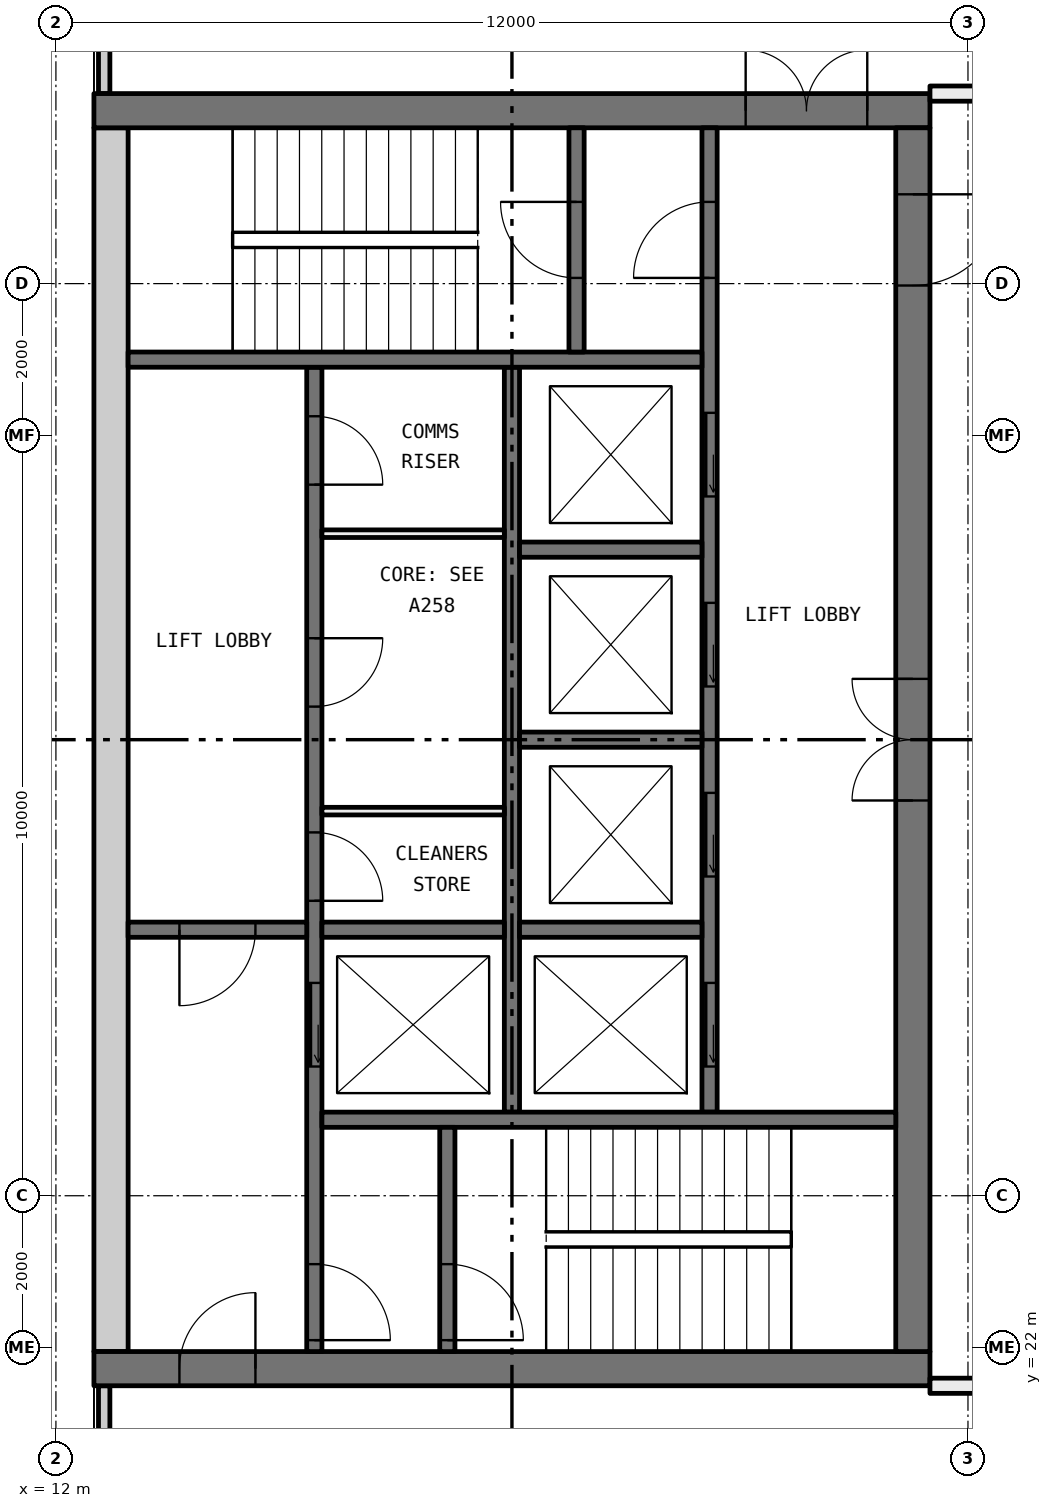
"""IFC4 building model, lengths in metres.
Left out: names, types, materials, properties, quantities, classifications, styles, units other than length and angle.
Written with IfcOpenShell. Run it as: python <this file> out.ifc"""

import sys

from ifc_helpers import new_model, si_unit, direction, frame, frame_2d, origin, place, context, subcontext, project, spatial, rectangle, extrude, element, fill, save


model = new_model("IFC4")
c1 = context("Model", 3, precision=1e-05, world=origin(), true_north=direction((0.0, 1.0)))
c2 = subcontext(c1, "Body", "Model", "MODEL_VIEW")
j1 = project(units=[si_unit("LENGTHUNIT", "METRE"), si_unit("PLANEANGLEUNIT", "RADIAN")], contexts=[c1])
p1 = place(None, origin())
s1 = spatial("IfcSite", under=j1, at=p1, CompositionType="ELEMENT")
p2 = place(p1, origin())
s2 = spatial("IfcBuilding", under=s1, at=p2, CompositionType="ELEMENT")
p3 = place(p2, frame((0.0, 0.0, 213.45)))
s3 = spatial("IfcBuildingStorey", under=s2, at=p3, CompositionType="ELEMENT", Elevation=213.45)
for number, where, z_axis, x_axis in (
    (1, (12.635, 18.71, 0.0), (0.0, 0.0, 1.0), (0.0, 1.0, 0.0)),
    (2, (12.635, 38.5, 0.0), (0.0, 0.0, 1.0), (0.0, 1.0, 0.0)),
):
    element("IfcWall", number, at=place(p3, frame(where, z_axis=z_axis, x_axis=x_axis)), inside=s3, PredefinedType="ELEMENTEDWALL", context=c2, shape_type="SweptSolid", body=[
        extrude(rectangle(XDim=2.79, YDim=0.15, at=frame_2d((1.395, 0.0))), origin(), (0.0, 0.0, 1.0), 4.1),
    ])
p4 = place(p3, frame((29.5, 21.5, 0.0), z_axis=(0.0, 0.0, 1.0), x_axis=(-1.0, 0.0, 0.0)))
e3 = element("IfcWall", 3, at=p4, inside=s3, PredefinedType="PARTITIONING", context=c2, shape_type="SweptSolid", body=[
    extrude(rectangle(XDim=6.0, YDim=0.2, at=frame_2d((3.0, 0.0))), origin(), (0.0, 0.0, 1.0), 4.1),
])
p5 = place(p4, frame((2.55, 0.0, 0.0)))
e4 = element("IfcOpeningElement", 4, at=p5, cuts=e3, PredefinedType="OPENING", context=c2, shape_type="SweptSolid", body=[
    extrude(rectangle(XDim=0.9, YDim=2.1, at=frame_2d((0.45, 1.05))), frame((0.0, 0.11, 0.0), z_axis=(0.0, -1.0, 0.0), x_axis=(1.0, 0.0, 0.0)), (0.0, 0.0, 1.0), 0.22),
])
p6 = place(p3, frame((23.5, 38.5, 0.0), z_axis=(0.0, 0.0, 1.0), x_axis=(1.0, 0.0, 0.0)))
e5 = element("IfcWall", 5, at=p6, inside=s3, PredefinedType="PARTITIONING", context=c2, shape_type="SweptSolid", body=[
    extrude(rectangle(XDim=6.0, YDim=0.2, at=frame_2d((3.0, 0.0))), origin(), (0.0, 0.0, 1.0), 4.1),
])
p7 = place(p3, frame((12.5, 21.725, 0.0), z_axis=(0.0, 0.0, 1.0), x_axis=(1.0, 0.0, 0.0)))
e6 = element("IfcWall", 6, at=p7, inside=s3, PredefinedType="SHEAR", context=c2, shape_type="SweptSolid", body=[
    extrude(rectangle(XDim=11.0, YDim=0.45, at=frame_2d((5.5, 0.0))), origin(), (0.0, 0.0, 1.0), 4.1),
])
p8 = place(p7, frame((1.125, 0.0, 0.0)))
e7 = element("IfcOpeningElement", 7, at=p8, cuts=e6, PredefinedType="OPENING", context=c2, shape_type="SweptSolid", body=[
    extrude(rectangle(XDim=1.0, YDim=2.1, at=frame_2d((0.5, 1.05))), frame((0.0, 0.235, 0.0), z_axis=(0.0, -1.0, 0.0), x_axis=(1.0, 0.0, 0.0)), (0.0, 0.0, 1.0), 0.47),
])
p9 = place(p3, frame((12.5, 38.275, 0.0), z_axis=(0.0, 0.0, 1.0), x_axis=(1.0, 0.0, 0.0)))
e8 = element("IfcWall", 8, at=p9, inside=s3, PredefinedType="SHEAR", context=c2, shape_type="SweptSolid", body=[
    extrude(rectangle(XDim=11.0, YDim=0.45, at=frame_2d((5.5, 0.0))), origin(), (0.0, 0.0, 1.0), 4.1),
])
p10 = place(p9, frame((8.575, 0.0, 0.0)))
e9 = element("IfcOpeningElement", 9, at=p10, cuts=e8, PredefinedType="OPENING", context=c2, shape_type="SweptSolid", body=[
    extrude(rectangle(XDim=1.6, YDim=2.1, at=frame_2d((0.8, 1.05))), frame((0.0, 0.235, 0.0), z_axis=(0.0, -1.0, 0.0), x_axis=(1.0, 0.0, 0.0)), (0.0, 0.0, 1.0), 0.47),
])
p11 = place(p3, frame((12.725, 21.95, 0.0), z_axis=(0.0, 0.0, 1.0), x_axis=(0.0, 1.0, 0.0)))
e10 = element("IfcWall", 10, at=p11, inside=s3, PredefinedType="SHEAR", context=c2, shape_type="SweptSolid", body=[
    extrude(rectangle(XDim=16.1, YDim=0.45, at=frame_2d((8.05, 0.0))), origin(), (0.0, 0.0, 1.0), 4.1),
])
p12 = place(p3, frame((23.275, 21.95, 0.0), z_axis=(0.0, 0.0, 1.0), x_axis=(0.0, 1.0, 0.0)))
e11 = element("IfcWall", 11, at=p12, inside=s3, PredefinedType="SHEAR", context=c2, shape_type="SweptSolid", body=[
    extrude(rectangle(XDim=16.1, YDim=0.45, at=frame_2d((8.05, 0.0))), origin(), (0.0, 0.0, 1.0), 4.1),
])
p13 = place(p12, frame((7.25, 0.0, 0.0)))
e12 = element("IfcOpeningElement", 12, at=p13, cuts=e11, PredefinedType="OPENING", context=c2, shape_type="SweptSolid", body=[
    extrude(rectangle(XDim=1.6, YDim=2.1, at=frame_2d((0.8, 1.05))), frame((0.0, 0.235, 0.0), z_axis=(0.0, -1.0, 0.0), x_axis=(1.0, 0.0, 0.0)), (0.0, 0.0, 1.0), 0.47),
])
p14 = place(p12, frame((14.025, 0.0, 0.0)))
e13 = element("IfcOpeningElement", 13, at=p14, cuts=e11, PredefinedType="OPENING", context=c2, shape_type="SweptSolid", body=[
    extrude(rectangle(XDim=1.2, YDim=2.1, at=frame_2d((0.6, 1.05))), frame((0.0, 0.235, 0.0), z_axis=(0.0, -1.0, 0.0), x_axis=(1.0, 0.0, 0.0)), (0.0, 0.0, 1.0), 0.47),
])
p15 = place(p3, frame((15.4, 21.95, 0.0), z_axis=(0.0, 0.0, 1.0), x_axis=(0.0, 1.0, 0.0)))
e14 = element("IfcWall", 14, at=p15, inside=s3, PredefinedType="SOLIDWALL", context=c2, shape_type="SweptSolid", body=[
    extrude(rectangle(XDim=12.95, YDim=0.2, at=frame_2d((6.475, 0.0))), origin(), (0.0, 0.0, 1.0), 4.1),
])
p16 = place(p15, frame((3.75, 0.0, 0.0)))
e15 = element("IfcOpeningElement", 15, at=p16, cuts=e14, PredefinedType="OPENING", context=c2, shape_type="SweptSolid", body=[
    extrude(rectangle(XDim=1.1, YDim=2.1, at=frame_2d((0.55, 1.05))), frame((0.0, 0.11, 0.0), z_axis=(0.0, -1.0, 0.0), x_axis=(1.0, 0.0, 0.0)), (0.0, 0.0, 1.0), 0.22),
])
p17 = place(p15, frame((0.15, 0.0, 0.0)))
e16 = element("IfcOpeningElement", 16, at=p17, cuts=e14, PredefinedType="OPENING", context=c2, shape_type="SweptSolid", body=[
    extrude(rectangle(XDim=1.0, YDim=2.1, at=frame_2d((0.5, 1.05))), frame((0.0, 0.11, 0.0), z_axis=(0.0, -1.0, 0.0), x_axis=(1.0, 0.0, 0.0)), (0.0, 0.0, 1.0), 0.22),
])
p18 = place(p15, frame((5.93, 0.0, 0.0)))
e17 = element("IfcOpeningElement", 17, at=p18, cuts=e14, PredefinedType="OPENING", context=c2, shape_type="SweptSolid", body=[
    extrude(rectangle(XDim=0.9, YDim=2.1, at=frame_2d((0.45, 1.05))), frame((0.0, 0.11, 0.0), z_axis=(0.0, -1.0, 0.0), x_axis=(1.0, 0.0, 0.0)), (0.0, 0.0, 1.0), 0.22),
])
p19 = place(p15, frame((8.485, 0.0, 0.0)))
e18 = element("IfcOpeningElement", 18, at=p19, cuts=e14, PredefinedType="OPENING", context=c2, shape_type="SweptSolid", body=[
    extrude(rectangle(XDim=0.9, YDim=2.1, at=frame_2d((0.45, 1.05))), frame((0.0, 0.11, 0.0), z_axis=(0.0, -1.0, 0.0), x_axis=(1.0, 0.0, 0.0)), (0.0, 0.0, 1.0), 0.22),
])
p20 = place(p15, frame((11.405, 0.0, 0.0)))
e19 = element("IfcOpeningElement", 19, at=p20, cuts=e14, PredefinedType="OPENING", context=c2, shape_type="SweptSolid", body=[
    extrude(rectangle(XDim=0.9, YDim=2.1, at=frame_2d((0.45, 1.05))), frame((0.0, 0.11, 0.0), z_axis=(0.0, -1.0, 0.0), x_axis=(1.0, 0.0, 0.0)), (0.0, 0.0, 1.0), 0.22),
])
p21 = place(p3, frame((20.6, 25.1, 0.0), z_axis=(0.0, 0.0, 1.0), x_axis=(0.0, 1.0, 0.0)))
e20 = element("IfcWall", 20, at=p21, inside=s3, PredefinedType="SOLIDWALL", context=c2, shape_type="SweptSolid", body=[
    extrude(rectangle(XDim=12.95, YDim=0.2, at=frame_2d((6.475, 0.0))), origin(), (0.0, 0.0, 1.0), 4.1),
])
p22 = place(p21, frame((0.6, 0.0, 0.0)))
e21 = element("IfcOpeningElement", 21, at=p22, cuts=e20, PredefinedType="OPENING", context=c2, shape_type="SweptSolid", body=[
    extrude(rectangle(XDim=1.1, YDim=2.1, at=frame_2d((0.55, 1.05))), frame((0.0, 0.11, 0.0), z_axis=(0.0, -1.0, 0.0), x_axis=(1.0, 0.0, 0.0)), (0.0, 0.0, 1.0), 0.22),
])
p23 = place(p21, frame((3.1, 0.0, 0.0)))
e22 = element("IfcOpeningElement", 22, at=p23, cuts=e20, PredefinedType="OPENING", context=c2, shape_type="SweptSolid", body=[
    extrude(rectangle(XDim=1.1, YDim=2.1, at=frame_2d((0.55, 1.05))), frame((0.0, 0.11, 0.0), z_axis=(0.0, -1.0, 0.0), x_axis=(1.0, 0.0, 0.0)), (0.0, 0.0, 1.0), 0.22),
])
p24 = place(p21, frame((5.6, 0.0, 0.0)))
e23 = element("IfcOpeningElement", 23, at=p24, cuts=e20, PredefinedType="OPENING", context=c2, shape_type="SweptSolid", body=[
    extrude(rectangle(XDim=1.1, YDim=2.1, at=frame_2d((0.55, 1.05))), frame((0.0, 0.11, 0.0), z_axis=(0.0, -1.0, 0.0), x_axis=(1.0, 0.0, 0.0)), (0.0, 0.0, 1.0), 0.22),
])
p25 = place(p21, frame((8.1, 0.0, 0.0)))
e24 = element("IfcOpeningElement", 24, at=p25, cuts=e20, PredefinedType="OPENING", context=c2, shape_type="SweptSolid", body=[
    extrude(rectangle(XDim=1.1, YDim=2.1, at=frame_2d((0.55, 1.05))), frame((0.0, 0.11, 0.0), z_axis=(0.0, -1.0, 0.0), x_axis=(1.0, 0.0, 0.0)), (0.0, 0.0, 1.0), 0.22),
])
p26 = place(p21, frame((10.975, 0.0, 0.0)))
e25 = element("IfcOpeningElement", 25, at=p26, cuts=e20, PredefinedType="OPENING", context=c2, shape_type="SweptSolid", body=[
    extrude(rectangle(XDim=1.0, YDim=2.1, at=frame_2d((0.5, 1.05))), frame((0.0, 0.11, 0.0), z_axis=(0.0, -1.0, 0.0), x_axis=(1.0, 0.0, 0.0)), (0.0, 0.0, 1.0), 0.22),
])
p27 = place(p3, frame((18.0, 25.1, 0.0), z_axis=(0.0, 0.0, 1.0), x_axis=(0.0, 1.0, 0.0)))
e26 = element("IfcWall", 26, at=p27, inside=s3, PredefinedType="SOLIDWALL", context=c2, shape_type="SweptSolid", body=[
    extrude(rectangle(XDim=9.8, YDim=0.2, at=frame_2d((4.9, 0.0))), origin(), (0.0, 0.0, 1.0), 4.1),
])
for number, where, z_axis, x_axis in (
    (27, (15.5, 25.0, 0.0), (0.0, 0.0, 1.0), (1.0, 0.0, 0.0)),
    (28, (12.95, 35.0, 0.0), (0.0, 0.0, 1.0), (1.0, 0.0, 0.0)),
):
    element("IfcWall", number, at=place(p3, frame(where, z_axis=z_axis, x_axis=x_axis)), inside=s3, PredefinedType="SOLIDWALL", context=c2, shape_type="SweptSolid", body=[
        extrude(rectangle(XDim=7.55, YDim=0.2, at=frame_2d((3.775, 0.0))), origin(), (0.0, 0.0, 1.0), 4.1),
    ])
p28 = place(p3, frame((12.95, 27.5, 0.0), z_axis=(0.0, 0.0, 1.0), x_axis=(1.0, 0.0, 0.0)))
e29 = element("IfcWall", 29, at=p28, inside=s3, PredefinedType="SOLIDWALL", context=c2, shape_type="SweptSolid", body=[
    extrude(rectangle(XDim=2.35, YDim=0.2, at=frame_2d((1.175, 0.0))), origin(), (0.0, 0.0, 1.0), 4.1),
])
p29 = place(p28, frame((0.675, 0.0, 0.0)))
e30 = element("IfcOpeningElement", 30, at=p29, cuts=e29, PredefinedType="OPENING", context=c2, shape_type="SweptSolid", body=[
    extrude(rectangle(XDim=1.0, YDim=2.1, at=frame_2d((0.5, 1.05))), frame((0.0, 0.11, 0.0), z_axis=(0.0, -1.0, 0.0), x_axis=(1.0, 0.0, 0.0)), (0.0, 0.0, 1.0), 0.22),
])
p30 = place(p3, frame((17.15, 21.95, 0.0), z_axis=(0.0, 0.0, 1.0), x_axis=(0.0, 1.0, 0.0)))
e31 = element("IfcWall", 31, at=p30, inside=s3, PredefinedType="SOLIDWALL", context=c2, shape_type="SweptSolid", body=[
    extrude(rectangle(XDim=2.95, YDim=0.2, at=frame_2d((1.475, 0.0))), origin(), (0.0, 0.0, 1.0), 4.1),
])
p31 = place(p30, frame((0.15, 0.0, 0.0)))
e32 = element("IfcOpeningElement", 32, at=p31, cuts=e31, PredefinedType="OPENING", context=c2, shape_type="SweptSolid", body=[
    extrude(rectangle(XDim=1.0, YDim=2.1, at=frame_2d((0.5, 1.05))), frame((0.0, 0.11, 0.0), z_axis=(0.0, -1.0, 0.0), x_axis=(1.0, 0.0, 0.0)), (0.0, 0.0, 1.0), 0.22),
])
p32 = place(p3, frame((18.85, 35.1, 0.0), z_axis=(0.0, 0.0, 1.0), x_axis=(0.0, 1.0, 0.0)))
e33 = element("IfcWall", 33, at=p32, inside=s3, PredefinedType="SOLIDWALL", context=c2, shape_type="SweptSolid", body=[
    extrude(rectangle(XDim=2.95, YDim=0.2, at=frame_2d((1.475, 0.0))), origin(), (0.0, 0.0, 1.0), 4.1),
])
p33 = place(p32, frame((0.975, 0.0, 0.0)))
e34 = element("IfcOpeningElement", 34, at=p33, cuts=e33, PredefinedType="OPENING", context=c2, shape_type="SweptSolid", body=[
    extrude(rectangle(XDim=1.0, YDim=2.1, at=frame_2d((0.5, 1.05))), frame((0.0, 0.11, 0.0), z_axis=(0.0, -1.0, 0.0), x_axis=(1.0, 0.0, 0.0)), (0.0, 0.0, 1.0), 0.22),
])
for number, where, z_axis, x_axis in (
    (35, (15.5, 27.5, 0.0), (0.0, 0.0, 1.0), (1.0, 0.0, 0.0)),
    (36, (18.1, 27.5, 0.0), (0.0, 0.0, 1.0), (1.0, 0.0, 0.0)),
    (37, (18.1, 30.0, 0.0), (0.0, 0.0, 1.0), (1.0, 0.0, 0.0)),
    (38, (18.1, 32.5, 0.0), (0.0, 0.0, 1.0), (1.0, 0.0, 0.0)),
):
    element("IfcWall", number, at=place(p3, frame(where, z_axis=z_axis, x_axis=x_axis)), inside=s3, PredefinedType="SOLIDWALL", context=c2, shape_type="SweptSolid", body=[
        extrude(rectangle(XDim=2.4, YDim=0.2, at=frame_2d((1.2, 0.0))), origin(), (0.0, 0.0, 1.0), 4.1),
    ])
for number, where, z_axis, x_axis in (
    (39, (15.5, 29.06, 0.0), (0.0, 0.0, 1.0), (1.0, 0.0, 0.0)),
    (40, (15.5, 32.71, 0.0), (0.0, 0.0, 1.0), (1.0, 0.0, 0.0)),
):
    element("IfcWall", number, at=place(p3, frame(where, z_axis=z_axis, x_axis=x_axis)), inside=s3, PredefinedType="PARTITIONING", context=c2, shape_type="SweptSolid", body=[
        extrude(rectangle(XDim=2.4, YDim=0.1, at=frame_2d((1.2, 0.0))), origin(), (0.0, 0.0, 1.0), 4.1),
    ])
p34 = place(p22, origin())
e41 = element("IfcDoor", 41, at=p34, inside=s3, OperationType="SLIDING_TO_LEFT", PredefinedType="DOOR", context=c2, shape_type="SweptSolid", body=[
    extrude(rectangle(XDim=1.1, YDim=2.1, at=frame_2d((0.55, 1.05))), frame((0.0, 0.025, 0.0), z_axis=(0.0, -1.0, 0.0), x_axis=(1.0, 0.0, 0.0)), (0.0, 0.0, 1.0), 0.05),
])
fill(e21, e41)
p35 = place(p23, origin())
e42 = element("IfcDoor", 42, at=p35, inside=s3, OperationType="SLIDING_TO_LEFT", PredefinedType="DOOR", context=c2, shape_type="SweptSolid", body=[
    extrude(rectangle(XDim=1.1, YDim=2.1, at=frame_2d((0.55, 1.05))), frame((0.0, 0.025, 0.0), z_axis=(0.0, -1.0, 0.0), x_axis=(1.0, 0.0, 0.0)), (0.0, 0.0, 1.0), 0.05),
])
fill(e22, e42)
p36 = place(p24, origin())
e43 = element("IfcDoor", 43, at=p36, inside=s3, OperationType="SLIDING_TO_LEFT", PredefinedType="DOOR", context=c2, shape_type="SweptSolid", body=[
    extrude(rectangle(XDim=1.1, YDim=2.1, at=frame_2d((0.55, 1.05))), frame((0.0, 0.025, 0.0), z_axis=(0.0, -1.0, 0.0), x_axis=(1.0, 0.0, 0.0)), (0.0, 0.0, 1.0), 0.05),
])
fill(e23, e43)
p37 = place(p25, origin())
e44 = element("IfcDoor", 44, at=p37, inside=s3, OperationType="SLIDING_TO_LEFT", PredefinedType="DOOR", context=c2, shape_type="SweptSolid", body=[
    extrude(rectangle(XDim=1.1, YDim=2.1, at=frame_2d((0.55, 1.05))), frame((0.0, 0.025, 0.0), z_axis=(0.0, -1.0, 0.0), x_axis=(1.0, 0.0, 0.0)), (0.0, 0.0, 1.0), 0.05),
])
fill(e24, e44)
p38 = place(p16, origin())
e45 = element("IfcDoor", 45, at=p38, inside=s3, OperationType="SLIDING_TO_LEFT", PredefinedType="DOOR", context=c2, shape_type="SweptSolid", body=[
    extrude(rectangle(XDim=1.1, YDim=2.1, at=frame_2d((0.55, 1.05))), frame((0.0, 0.025, 0.0), z_axis=(0.0, -1.0, 0.0), x_axis=(1.0, 0.0, 0.0)), (0.0, 0.0, 1.0), 0.05),
])
fill(e15, e45)
p39 = place(p31, frame((1.0, 0.0, 0.0), x_axis=(-1.0, 0.0, 0.0)))
e46 = element("IfcDoor", 46, at=p39, inside=s3, OperationType="SINGLE_SWING_LEFT", PredefinedType="DOOR", context=c2, shape_type="SweptSolid", body=[
    extrude(rectangle(XDim=1.0, YDim=2.1, at=frame_2d((0.5, 1.05))), frame((0.0, 0.025, 0.0), z_axis=(0.0, -1.0, 0.0), x_axis=(1.0, 0.0, 0.0)), (0.0, 0.0, 1.0), 0.05),
])
fill(e32, e46)
p40 = place(p17, frame((1.0, 0.0, 0.0), x_axis=(-1.0, 0.0, 0.0)))
e47 = element("IfcDoor", 47, at=p40, inside=s3, OperationType="SINGLE_SWING_LEFT", PredefinedType="DOOR", context=c2, shape_type="SweptSolid", body=[
    extrude(rectangle(XDim=1.0, YDim=2.1, at=frame_2d((0.5, 1.05))), frame((0.0, 0.025, 0.0), z_axis=(0.0, -1.0, 0.0), x_axis=(1.0, 0.0, 0.0)), (0.0, 0.0, 1.0), 0.05),
])
fill(e16, e47)
p41 = place(p26, origin())
e48 = element("IfcDoor", 48, at=p41, inside=s3, OperationType="SINGLE_SWING_RIGHT", PredefinedType="DOOR", context=c2, shape_type="SweptSolid", body=[
    extrude(rectangle(XDim=1.0, YDim=2.1, at=frame_2d((0.5, 1.05))), frame((0.0, 0.025, 0.0), z_axis=(0.0, -1.0, 0.0), x_axis=(1.0, 0.0, 0.0)), (0.0, 0.0, 1.0), 0.05),
])
fill(e25, e48)
p42 = place(p33, origin())
e49 = element("IfcDoor", 49, at=p42, inside=s3, OperationType="SINGLE_SWING_LEFT", PredefinedType="DOOR", context=c2, shape_type="SweptSolid", body=[
    extrude(rectangle(XDim=1.0, YDim=2.1, at=frame_2d((0.5, 1.05))), frame((0.0, 0.025, 0.0), z_axis=(0.0, -1.0, 0.0), x_axis=(1.0, 0.0, 0.0)), (0.0, 0.0, 1.0), 0.05),
])
fill(e34, e49)
p43 = place(p29, frame((1.0, 0.0, 0.0), x_axis=(-1.0, 0.0, 0.0)))
e50 = element("IfcDoor", 50, at=p43, inside=s3, OperationType="SINGLE_SWING_LEFT", PredefinedType="DOOR", context=c2, shape_type="SweptSolid", body=[
    extrude(rectangle(XDim=1.0, YDim=2.1, at=frame_2d((0.5, 1.05))), frame((0.0, 0.025, 0.0), z_axis=(0.0, -1.0, 0.0), x_axis=(1.0, 0.0, 0.0)), (0.0, 0.0, 1.0), 0.05),
])
fill(e30, e50)
p44 = place(p8, origin())
e51 = element("IfcDoor", 51, at=p44, inside=s3, OperationType="SINGLE_SWING_LEFT", PredefinedType="DOOR", context=c2, shape_type="SweptSolid", body=[
    extrude(rectangle(XDim=1.0, YDim=2.1, at=frame_2d((0.5, 1.05))), frame((0.0, 0.025, 0.0), z_axis=(0.0, -1.0, 0.0), x_axis=(1.0, 0.0, 0.0)), (0.0, 0.0, 1.0), 0.05),
])
fill(e7, e51)
p45 = place(p10, origin())
e52 = element("IfcDoor", 52, at=p45, inside=s3, OperationType="DOUBLE_DOOR_SINGLE_SWING", PredefinedType="DOOR", context=c2, shape_type="SweptSolid", body=[
    extrude(rectangle(XDim=1.6, YDim=2.1, at=frame_2d((0.8, 1.05))), frame((0.0, 0.025, 0.0), z_axis=(0.0, -1.0, 0.0), x_axis=(1.0, 0.0, 0.0)), (0.0, 0.0, 1.0), 0.05),
])
fill(e9, e52)
p46 = place(p13, origin())
e53 = element("IfcDoor", 53, at=p46, inside=s3, OperationType="DOUBLE_DOOR_SINGLE_SWING", PredefinedType="DOOR", context=c2, shape_type="SweptSolid", body=[
    extrude(rectangle(XDim=1.6, YDim=2.1, at=frame_2d((0.8, 1.05))), frame((0.0, 0.025, 0.0), z_axis=(0.0, -1.0, 0.0), x_axis=(1.0, 0.0, 0.0)), (0.0, 0.0, 1.0), 0.05),
])
fill(e12, e53)
p47 = place(p14, frame((1.2, 0.0, 0.0), x_axis=(-1.0, 0.0, 0.0)))
e54 = element("IfcDoor", 54, at=p47, inside=s3, OperationType="SINGLE_SWING_RIGHT", PredefinedType="DOOR", context=c2, shape_type="SweptSolid", body=[
    extrude(rectangle(XDim=1.2, YDim=2.1, at=frame_2d((0.6, 1.05))), frame((0.0, 0.025, 0.0), z_axis=(0.0, -1.0, 0.0), x_axis=(1.0, 0.0, 0.0)), (0.0, 0.0, 1.0), 0.05),
])
fill(e13, e54)
p48 = place(p18, frame((0.9, 0.0, 0.0), x_axis=(-1.0, 0.0, 0.0)))
e55 = element("IfcDoor", 55, at=p48, inside=s3, OperationType="SINGLE_SWING_LEFT", PredefinedType="DOOR", context=c2, shape_type="SweptSolid", body=[
    extrude(rectangle(XDim=0.9, YDim=2.1, at=frame_2d((0.45, 1.05))), frame((0.0, 0.025, 0.0), z_axis=(0.0, -1.0, 0.0), x_axis=(1.0, 0.0, 0.0)), (0.0, 0.0, 1.0), 0.05),
])
fill(e17, e55)
p49 = place(p19, frame((0.9, 0.0, 0.0), x_axis=(-1.0, 0.0, 0.0)))
e56 = element("IfcDoor", 56, at=p49, inside=s3, OperationType="SINGLE_SWING_RIGHT", PredefinedType="DOOR", context=c2, shape_type="SweptSolid", body=[
    extrude(rectangle(XDim=0.9, YDim=2.1, at=frame_2d((0.45, 1.05))), frame((0.0, 0.025, 0.0), z_axis=(0.0, -1.0, 0.0), x_axis=(1.0, 0.0, 0.0)), (0.0, 0.0, 1.0), 0.05),
])
fill(e18, e56)
p50 = place(p20, frame((0.9, 0.0, 0.0), x_axis=(-1.0, 0.0, 0.0)))
e57 = element("IfcDoor", 57, at=p50, inside=s3, OperationType="SINGLE_SWING_LEFT", PredefinedType="DOOR", context=c2, shape_type="SweptSolid", body=[
    extrude(rectangle(XDim=0.9, YDim=2.1, at=frame_2d((0.45, 1.05))), frame((0.0, 0.025, 0.0), z_axis=(0.0, -1.0, 0.0), x_axis=(1.0, 0.0, 0.0)), (0.0, 0.0, 1.0), 0.05),
])
fill(e19, e57)
save(model, sys.argv[1])
